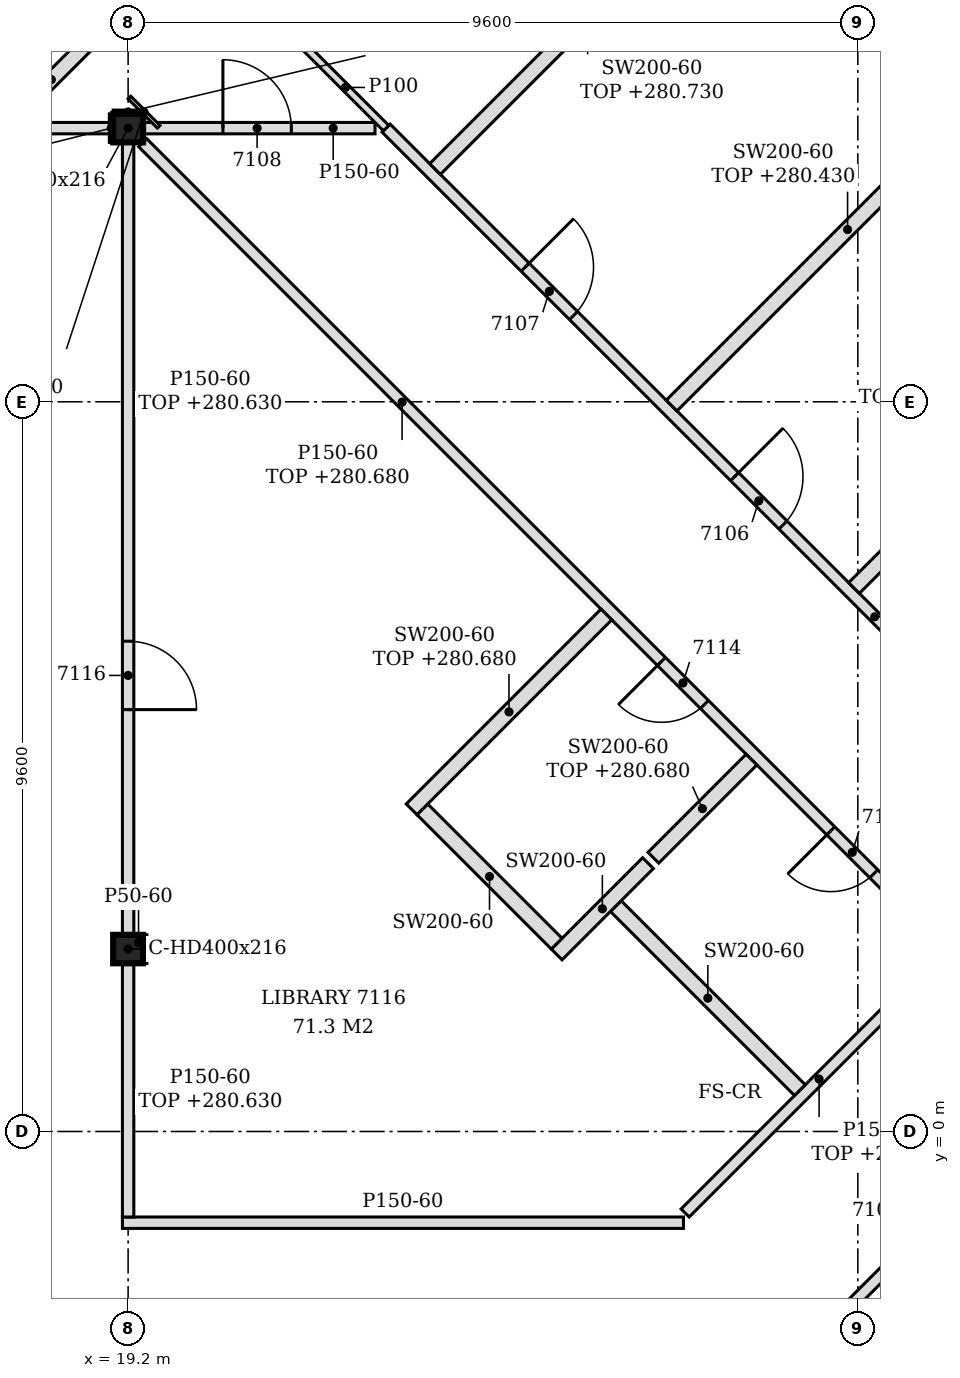
"""IFC4 building model, lengths in metres.
Left out: names, types, materials, properties, quantities, classifications, styles, units other than length and angle.
Written with IfcOpenShell. Run it as: python <this file> out.ifc"""

import sys

from ifc_helpers import new_model, si_unit, direction, frame, frame_2d, origin, origin_2d, place, context, subcontext, project, spatial, polyline, rectangle, i_section, outline, extrude, element, fill, save


model = new_model("IFC4")
c1 = context("Model", 3, precision=1e-05, world=origin(), true_north=direction((0.0, 1.0)))
c2 = subcontext(c1, "Body", "Model", "MODEL_VIEW")
j1 = project(units=[si_unit("LENGTHUNIT", "METRE"), si_unit("PLANEANGLEUNIT", "RADIAN")], contexts=[c1])
p1 = place(None, origin())
s1 = spatial("IfcSite", under=j1, at=p1, CompositionType="ELEMENT")
p2 = place(p1, origin())
s2 = spatial("IfcBuilding", under=s1, at=p2, CompositionType="ELEMENT")
p3 = place(p2, frame((0.0, 0.0, 277.8)))
s3 = spatial("IfcBuildingStorey", under=s2, at=p3, CompositionType="ELEMENT", Elevation=277.8)
for number, where, z_axis, x_axis in (
    (1, (19.2, 2.4, -0.15), (0.0, 0.0, 1.0), (1.0, 0.0, 0.0)),
    (2, (19.2, 13.2, -0.15), (0.0, 0.0, 1.0), (1.0, 0.0, 0.0)),
):
    element("IfcColumn", number, at=place(p3, frame(where, z_axis=z_axis, x_axis=x_axis)), inside=s3, PredefinedType="COLUMN", context=c2, shape_type="SweptSolid", body=[
        extrude(i_section(OverallWidth=0.394, OverallDepth=0.375, WebThickness=0.017, FlangeThickness=0.028, FilletRadius=0.015, at=origin_2d()), origin(), (0.0, 0.0, 1.0), 3.6),
    ])
p4 = place(p3, frame((13.122, -17.872, 0.0), z_axis=(0.0, 0.0, 1.0), x_axis=(0.707101927234, 0.707111635106, 0.0)))
e3 = element("IfcWall", 3, at=p4, inside=s3, PredefinedType="PARTITIONING", context=c2, shape_type="SweptSolid", body=[
    extrude(rectangle(XDim=25.149, YDim=0.15, at=frame_2d((12.574, 0.0))), origin(), (0.0, 0.0, 1.0), 2.73),
])
p5 = place(p4, frame((4.672, 0.0, 0.0)))
e4 = element("IfcOpeningElement", 4, at=p5, cuts=e3, PredefinedType="OPENING", context=c2, shape_type="SweptSolid", body=[
    extrude(rectangle(XDim=0.9, YDim=2.1, at=frame_2d((0.45, 1.05))), frame((0.0, 0.085, 0.0), z_axis=(0.0, -1.0, 0.0), x_axis=(1.0, 0.0, 0.0)), (0.0, 0.0, 1.0), 0.17),
])
p6 = place(p4, frame((14.284, 0.0, 0.0)))
e5 = element("IfcOpeningElement", 5, at=p6, cuts=e3, PredefinedType="OPENING", context=c2, shape_type="SweptSolid", body=[
    extrude(rectangle(XDim=0.9, YDim=2.1, at=frame_2d((0.45, 1.05))), frame((0.0, 0.085, 0.0), z_axis=(0.0, -1.0, 0.0), x_axis=(1.0, 0.0, 0.0)), (0.0, 0.0, 1.0), 0.17),
])
p7 = place(p4, frame((22.704, 0.0, 0.0)))
e6 = element("IfcOpeningElement", 6, at=p7, cuts=e3, PredefinedType="OPENING", context=c2, shape_type="SweptSolid", body=[
    extrude(rectangle(XDim=0.9, YDim=2.1, at=frame_2d((0.45, 1.05))), frame((0.0, 0.085, 0.0), z_axis=(0.0, -1.0, 0.0), x_axis=(1.0, 0.0, 0.0)), (0.0, 0.0, 1.0), 0.17),
])
p8 = place(p3, frame((19.125, -1.2, 0.0), z_axis=(0.0, 0.0, 1.0), x_axis=(1.0, 0.0, 0.0)))
e7 = element("IfcWall", 7, at=p8, inside=s3, PredefinedType="PARTITIONING", context=c2, shape_type="SweptSolid", body=[
    extrude(outline(polyline([(0.0, 0.0), (7.381, 0.0), (7.381, 3.45), (0.225, 3.45), (0.223, 2.83), (0.0, 2.83), (0.0, 0.0)])), frame((0.0, 0.075, 0.0), z_axis=(0.0, -1.0, 0.0), x_axis=(1.0, 0.0, 0.0)), (0.0, 0.0, 1.0), 0.15),
])
p9 = place(p3, frame((19.2, -1.125, 0.0), z_axis=(0.0, 0.0, 1.0), x_axis=(0.0, 1.0, 0.0)))
e8 = element("IfcWall", 8, at=p9, inside=s3, PredefinedType="PARTITIONING", context=c2, shape_type="SweptSolid", body=[
    extrude(rectangle(XDim=3.337, YDim=0.15, at=frame_2d((1.669, 0.0))), origin(), (0.0, 0.0, 1.0), 2.83),
])
p10 = place(p3, frame((26.528, -1.072, 0.0), z_axis=(0.0, 0.0, 1.0), x_axis=(0.707106781187, 0.707106781187, 0.0)))
e9 = element("IfcWall", 9, at=p10, inside=s3, PredefinedType="PARTITIONING", context=c2, shape_type="SweptSolid", body=[
    extrude(rectangle(XDim=4.985, YDim=0.15, at=frame_2d((2.492, 0.0))), origin(), (0.0, 0.0, 1.0), 2.88),
])
p11 = place(p3, frame((28.038, 0.544, 0.0), z_axis=(0.0, 0.0, 1.0), x_axis=(-0.707213699878, 0.706999846325, 0.0)))
e10 = element("IfcWall", 10, at=p11, inside=s3, PredefinedType="PARTITIONING", context=c2, shape_type="SweptSolid", body=[
    extrude(rectangle(XDim=3.425, YDim=0.2, at=frame_2d((1.712, 0.0))), origin(), (0.0, 0.0, 1.0), 3.45),
])
p12 = place(p3, frame((24.838, 2.329, 0.0), z_axis=(0.0, 0.0, 1.0), x_axis=(0.707034938994, 0.70717861608, 0.0)))
e11 = element("IfcWall", 11, at=p12, inside=s3, PredefinedType="PARTITIONING", context=c2, shape_type="SweptSolid", body=[
    extrude(rectangle(XDim=1.699, YDim=0.2, at=frame_2d((0.85, 0.0))), origin(), (0.0, 0.0, 1.0), 3.45),
])
p13 = place(p3, frame((24.838, 2.471, 0.0), z_axis=(0.0, 0.0, 1.0), x_axis=(-0.707106781187, 0.707106781187, 0.0)))
e12 = element("IfcWall", 12, at=p13, inside=s3, PredefinedType="PARTITIONING", context=c2, shape_type="SweptSolid", body=[
    extrude(rectangle(XDim=2.5, YDim=0.2, at=frame_2d((1.25, 0.0))), origin(), (0.0, 0.0, 1.0), 3.45),
])
p14 = place(p3, frame((29.947, 2.453, 0.0), z_axis=(0.0, 0.0, 1.0), x_axis=(-0.707098603185, 0.707114959093, 0.0)))
e13 = element("IfcWall", 13, at=p14, inside=s3, PredefinedType="PARTITIONING", context=c2, shape_type="SweptSolid", body=[
    extrude(rectangle(XDim=14.927, YDim=0.15, at=frame_2d((7.463, 0.0))), origin(), (0.0, 0.0, 1.0), 2.88),
])
p15 = place(p14, frame((1.325, 0.0, 0.0)))
e14 = element("IfcOpeningElement", 14, at=p15, cuts=e13, PredefinedType="OPENING", context=c2, shape_type="SweptSolid", body=[
    extrude(rectangle(XDim=0.8, YDim=2.1, at=frame_2d((0.4, 1.05))), frame((0.0, 0.085, 0.0), z_axis=(0.0, -1.0, 0.0), x_axis=(1.0, 0.0, 0.0)), (0.0, 0.0, 1.0), 0.17),
])
p16 = place(p14, frame((4.476, 0.0, 0.0)))
e15 = element("IfcOpeningElement", 15, at=p16, cuts=e13, PredefinedType="OPENING", context=c2, shape_type="SweptSolid", body=[
    extrude(rectangle(XDim=0.8, YDim=2.1, at=frame_2d((0.4, 1.05))), frame((0.0, 0.085, 0.0), z_axis=(0.0, -1.0, 0.0), x_axis=(1.0, 0.0, 0.0)), (0.0, 0.0, 1.0), 0.17),
])
p17 = place(p3, frame((19.2, 2.587, 0.0), z_axis=(0.0, 0.0, 1.0), x_axis=(0.0, 1.0, 0.0)))
e16 = element("IfcWall", 16, at=p17, inside=s3, PredefinedType="PARTITIONING", context=c2, shape_type="SweptSolid", body=[
    extrude(rectangle(XDim=10.425, YDim=0.15, at=frame_2d((5.212, 0.0))), origin(), (0.0, 0.0, 1.0), 2.83),
])
p18 = place(p17, frame((2.962, 0.0, 0.0)))
e17 = element("IfcOpeningElement", 17, at=p18, cuts=e16, PredefinedType="OPENING", context=c2, shape_type="SweptSolid", body=[
    extrude(rectangle(XDim=0.9, YDim=2.1, at=frame_2d((0.45, 1.05))), frame((0.0, 0.085, 0.0), z_axis=(0.0, -1.0, 0.0), x_axis=(1.0, 0.0, 0.0)), (0.0, 0.0, 1.0), 0.17),
])
p19 = place(p3, frame((32.272, 3.522, 0.0), z_axis=(0.0, 0.0, 1.0), x_axis=(-0.707106781187, 0.707106781187, 0.0)))
e18 = element("IfcWall", 18, at=p19, inside=s3, PredefinedType="PARTITIONING", context=c2, shape_type="SweptSolid", body=[
    extrude(rectangle(XDim=13.687, YDim=0.15, at=frame_2d((6.843, 0.0))), origin(), (0.0, 0.0, 1.0), 2.88),
])
p20 = place(p19, frame((1.988, 0.0, 0.0)))
e19 = element("IfcOpeningElement", 19, at=p20, cuts=e18, PredefinedType="OPENING", context=c2, shape_type="SweptSolid", body=[
    extrude(rectangle(XDim=0.9, YDim=2.1, at=frame_2d((0.45, 1.05))), frame((0.0, 0.085, 0.0), z_axis=(0.0, -1.0, 0.0), x_axis=(1.0, 0.0, 0.0)), (0.0, 0.0, 1.0), 0.17),
])
p21 = place(p19, frame((6.303, 0.0, 0.0)))
e20 = element("IfcOpeningElement", 20, at=p21, cuts=e18, PredefinedType="OPENING", context=c2, shape_type="SweptSolid", body=[
    extrude(rectangle(XDim=0.9, YDim=2.1, at=frame_2d((0.45, 1.05))), frame((0.0, 0.085, 0.0), z_axis=(0.0, -1.0, 0.0), x_axis=(1.0, 0.0, 0.0)), (0.0, 0.0, 1.0), 0.17),
])
p22 = place(p19, frame((10.2, 0.0, 0.0)))
e21 = element("IfcOpeningElement", 21, at=p22, cuts=e18, PredefinedType="OPENING", context=c2, shape_type="SweptSolid", body=[
    extrude(rectangle(XDim=0.9, YDim=2.1, at=frame_2d((0.45, 1.05))), frame((0.0, 0.085, 0.0), z_axis=(0.0, -1.0, 0.0), x_axis=(1.0, 0.0, 0.0)), (0.0, 0.0, 1.0), 0.17),
])
p23 = place(p3, frame((26.111, 3.602, 0.0), z_axis=(0.0, 0.0, 1.0), x_axis=(0.706906117117, 0.707307388328, 0.0)))
e22 = element("IfcWall", 22, at=p23, inside=s3, PredefinedType="PARTITIONING", context=c2, shape_type="SweptSolid", body=[
    extrude(rectangle(XDim=1.825, YDim=0.2, at=frame_2d((0.913, 0.0))), origin(), (0.0, 0.0, 1.0), 2.88),
])
p24 = place(p3, frame((22.929, 4.238, 0.0), z_axis=(0.0, 0.0, 1.0), x_axis=(0.706972068525, 0.707241468189, 0.0)))
e23 = element("IfcWall", 23, at=p24, inside=s3, PredefinedType="PARTITIONING", context=c2, shape_type="SweptSolid", body=[
    extrude(rectangle(XDim=3.625, YDim=0.2, at=frame_2d((1.812, 0.0))), origin(), (0.0, 0.0, 1.0), 2.88),
])
p25 = place(p3, frame((28.75, 7.15, 0.0), z_axis=(0.0, 0.0, 1.0), x_axis=(0.707106781187, 0.707106781187, 0.0)))
e24 = element("IfcWall", 24, at=p25, inside=s3, PredefinedType="PARTITIONING", context=c2, shape_type="SweptSolid", body=[
    extrude(rectangle(XDim=3.193, YDim=0.2, at=frame_2d((1.597, 0.0))), origin(), (0.0, 0.0, 1.0), 2.93),
])
p26 = place(p3, frame((26.35, 9.55, 0.0), z_axis=(0.0, 0.0, 1.0), x_axis=(0.707088140984, 0.707125420898, 0.0)))
e25 = element("IfcWall", 25, at=p26, inside=s3, PredefinedType="PARTITIONING", context=c2, shape_type="SweptSolid", body=[
    extrude(rectangle(XDim=6.549, YDim=0.2, at=frame_2d((3.274, 0.0))), origin(), (0.0, 0.0, 1.0), 2.63),
])
p27 = place(p3, frame((23.238, 12.662, 0.0), z_axis=(0.0, 0.0, 1.0), x_axis=(0.707128276734, 0.707085284986, 0.0)))
e26 = element("IfcWall", 26, at=p27, inside=s3, PredefinedType="PARTITIONING", context=c2, shape_type="SweptSolid", body=[
    extrude(rectangle(XDim=5.679, YDim=0.2, at=frame_2d((2.839, 0.0))), origin(), (0.0, 0.0, 1.0), 2.93),
])
p28 = place(p3, frame((7.397, 13.2, 0.0), z_axis=(0.0, 0.0, 1.0), x_axis=(1.0, 0.0, 0.0)))
e27 = element("IfcWall", 27, at=p28, inside=s3, PredefinedType="PARTITIONING", context=c2, shape_type="SweptSolid", body=[
    extrude(rectangle(XDim=11.606, YDim=0.15, at=frame_2d((5.803, 0.0))), origin(), (0.0, 0.0, 1.0), 2.83),
])
p29 = place(p28, frame((8.129, 0.0, 0.0)))
e28 = element("IfcOpeningElement", 28, at=p29, cuts=e27, PredefinedType="OPENING", context=c2, shape_type="SweptSolid", body=[
    extrude(rectangle(XDim=0.9, YDim=2.1, at=frame_2d((0.45, 1.05))), frame((0.0, 0.085, 0.0), z_axis=(0.0, -1.0, 0.0), x_axis=(1.0, 0.0, 0.0)), (0.0, 0.0, 1.0), 0.17),
])
p30 = place(p3, frame((19.397, 13.2, 0.0), z_axis=(0.0, 0.0, 1.0), x_axis=(1.0, 0.0, 0.0)))
e29 = element("IfcWall", 29, at=p30, inside=s3, PredefinedType="PARTITIONING", context=c2, shape_type="SweptSolid", body=[
    extrude(rectangle(XDim=3.051, YDim=0.15, at=frame_2d((1.526, 0.0))), origin(), (0.0, 0.0, 1.0), 3.45),
])
p31 = place(p30, frame((1.05, 0.0, 0.0)))
e30 = element("IfcOpeningElement", 30, at=p31, cuts=e29, PredefinedType="OPENING", context=c2, shape_type="SweptSolid", body=[
    extrude(rectangle(XDim=0.9, YDim=2.1, at=frame_2d((0.45, 1.05))), frame((0.0, 0.085, 0.0), z_axis=(0.0, -1.0, 0.0), x_axis=(1.0, 0.0, 0.0)), (0.0, 0.0, 1.0), 0.17),
])
p32 = place(p3, frame((22.594, 13.2, 0.0), z_axis=(0.0, 0.0, 1.0), x_axis=(-0.707106781187, 0.707106781187, 0.0)))
e31 = element("IfcWall", 31, at=p32, inside=s3, PredefinedType="PARTITIONING", context=c2, shape_type="SweptSolid", body=[
    extrude(rectangle(XDim=1.514, YDim=0.1, at=frame_2d((0.757, 0.0))), origin(), (0.0, 0.0, 1.0), 3.45),
])
p33 = place(p3, frame((17.698, 13.346, 0.0), z_axis=(0.0, 0.0, 1.0), x_axis=(0.707019164958, 0.70719438656, 0.0)))
e32 = element("IfcWall", 32, at=p33, inside=s3, PredefinedType="PARTITIONING", context=c2, shape_type="SweptSolid", body=[
    extrude(rectangle(XDim=1.393, YDim=0.2, at=frame_2d((0.697, 0.0))), origin(), (0.0, 0.0, 1.0), 2.83),
])
p34 = place(p3, frame((19.422, 2.212, 0.0), z_axis=(0.0, 0.0, 1.0), x_axis=(0.0, 1.0, 0.0)))
e33 = element("IfcWall", 33, at=p34, inside=s3, PredefinedType="PARTITIONING", context=c2, shape_type="SweptSolid", body=[
    extrude(rectangle(XDim=0.375, YDim=0.05, at=frame_2d((0.188, 0.0))), origin(), (0.0, 0.0, 1.0), 3.45),
])
p35 = place(p3, frame((18.978, 13.012, 0.0), z_axis=(0.0, 0.0, 1.0), x_axis=(0.0, 1.0, 0.0)))
e34 = element("IfcWall", 34, at=p35, inside=s3, PredefinedType="PARTITIONING", context=c2, shape_type="SweptSolid", body=[
    extrude(rectangle(XDim=0.375, YDim=0.05, at=frame_2d((0.188, 0.0))), origin(), (0.0, 0.0, 1.0), 2.83),
])
p36 = place(p3, frame((19.602, 13.218, 0.0), z_axis=(0.0, 0.0, 1.0), x_axis=(-0.707106781187, 0.707106781187, 0.0)))
e35 = element("IfcWall", 35, at=p36, inside=s3, PredefinedType="PARTITIONING", context=c2, shape_type="SweptSolid", body=[
    extrude(rectangle(XDim=0.544, YDim=0.05, at=frame_2d((0.272, 0.0))), origin(), (0.0, 0.0, 1.0), 2.93),
])
p37 = place(p3, frame((19.003, 13.413, 0.0), z_axis=(0.0, 0.0, 1.0), x_axis=(1.0, 0.0, 0.0)))
e36 = element("IfcWall", 36, at=p37, inside=s3, PredefinedType="PARTITIONING", context=c2, shape_type="SweptSolid", body=[
    extrude(rectangle(XDim=0.394, YDim=0.05, at=frame_2d((0.197, 0.0))), origin(), (0.0, 0.0, 1.0), 2.93),
])
p38 = place(p21, frame((0.9, 0.0, 0.0), z_axis=(0.0, 0.0, 1.0), x_axis=(-1.0, 0.0, 0.0)))
e37 = element("IfcDoor", 37, at=p38, inside=s3, OperationType="SINGLE_SWING_LEFT", PredefinedType="DOOR", context=c2, shape_type="SweptSolid", body=[
    extrude(rectangle(XDim=0.9, YDim=2.1, at=frame_2d((0.45, 1.05))), frame((0.0, 0.025, 0.0), z_axis=(0.0, -1.0, 0.0), x_axis=(1.0, 0.0, 0.0)), (0.0, 0.0, 1.0), 0.05),
])
fill(e20, e37)
p39 = place(p22, frame((0.9, 0.0, 0.0), z_axis=(0.0, 0.0, 1.0), x_axis=(-1.0, 0.0, 0.0)))
e38 = element("IfcDoor", 38, at=p39, inside=s3, OperationType="SINGLE_SWING_LEFT", PredefinedType="DOOR", context=c2, shape_type="SweptSolid", body=[
    extrude(rectangle(XDim=0.9, YDim=2.1, at=frame_2d((0.45, 1.05))), frame((0.0, 0.025, 0.0), z_axis=(0.0, -1.0, 0.0), x_axis=(1.0, 0.0, 0.0)), (0.0, 0.0, 1.0), 0.05),
])
fill(e21, e38)
p40 = place(p31, origin())
e39 = element("IfcDoor", 39, at=p40, inside=s3, OperationType="SINGLE_SWING_LEFT", PredefinedType="DOOR", context=c2, shape_type="SweptSolid", body=[
    extrude(rectangle(XDim=0.9, YDim=2.1, at=frame_2d((0.45, 1.05))), frame((0.0, 0.025, 0.0), z_axis=(0.0, -1.0, 0.0), x_axis=(1.0, 0.0, 0.0)), (0.0, 0.0, 1.0), 0.05),
])
fill(e30, e39)
p41 = place(p15, origin())
e40 = element("IfcDoor", 40, at=p41, inside=s3, OperationType="SINGLE_SWING_RIGHT", PredefinedType="DOOR", context=c2, shape_type="SweptSolid", body=[
    extrude(rectangle(XDim=0.8, YDim=2.1, at=frame_2d((0.4, 1.05))), frame((0.0, 0.025, 0.0), z_axis=(0.0, -1.0, 0.0), x_axis=(1.0, 0.0, 0.0)), (0.0, 0.0, 1.0), 0.05),
])
fill(e14, e40)
p42 = place(p16, origin())
e41 = element("IfcDoor", 41, at=p42, inside=s3, OperationType="SINGLE_SWING_RIGHT", PredefinedType="DOOR", context=c2, shape_type="SweptSolid", body=[
    extrude(rectangle(XDim=0.8, YDim=2.1, at=frame_2d((0.4, 1.05))), frame((0.0, 0.025, 0.0), z_axis=(0.0, -1.0, 0.0), x_axis=(1.0, 0.0, 0.0)), (0.0, 0.0, 1.0), 0.05),
])
fill(e15, e41)
p43 = place(p18, frame((0.9, 0.0, 0.0), z_axis=(0.0, 0.0, 1.0), x_axis=(-1.0, 0.0, 0.0)))
e42 = element("IfcDoor", 42, at=p43, inside=s3, OperationType="SINGLE_SWING_RIGHT", PredefinedType="DOOR", context=c2, shape_type="SweptSolid", body=[
    extrude(rectangle(XDim=0.9, YDim=2.1, at=frame_2d((0.45, 1.05))), frame((0.0, 0.025, 0.0), z_axis=(0.0, -1.0, 0.0), x_axis=(1.0, 0.0, 0.0)), (0.0, 0.0, 1.0), 0.05),
])
fill(e17, e42)
save(model, sys.argv[1])
